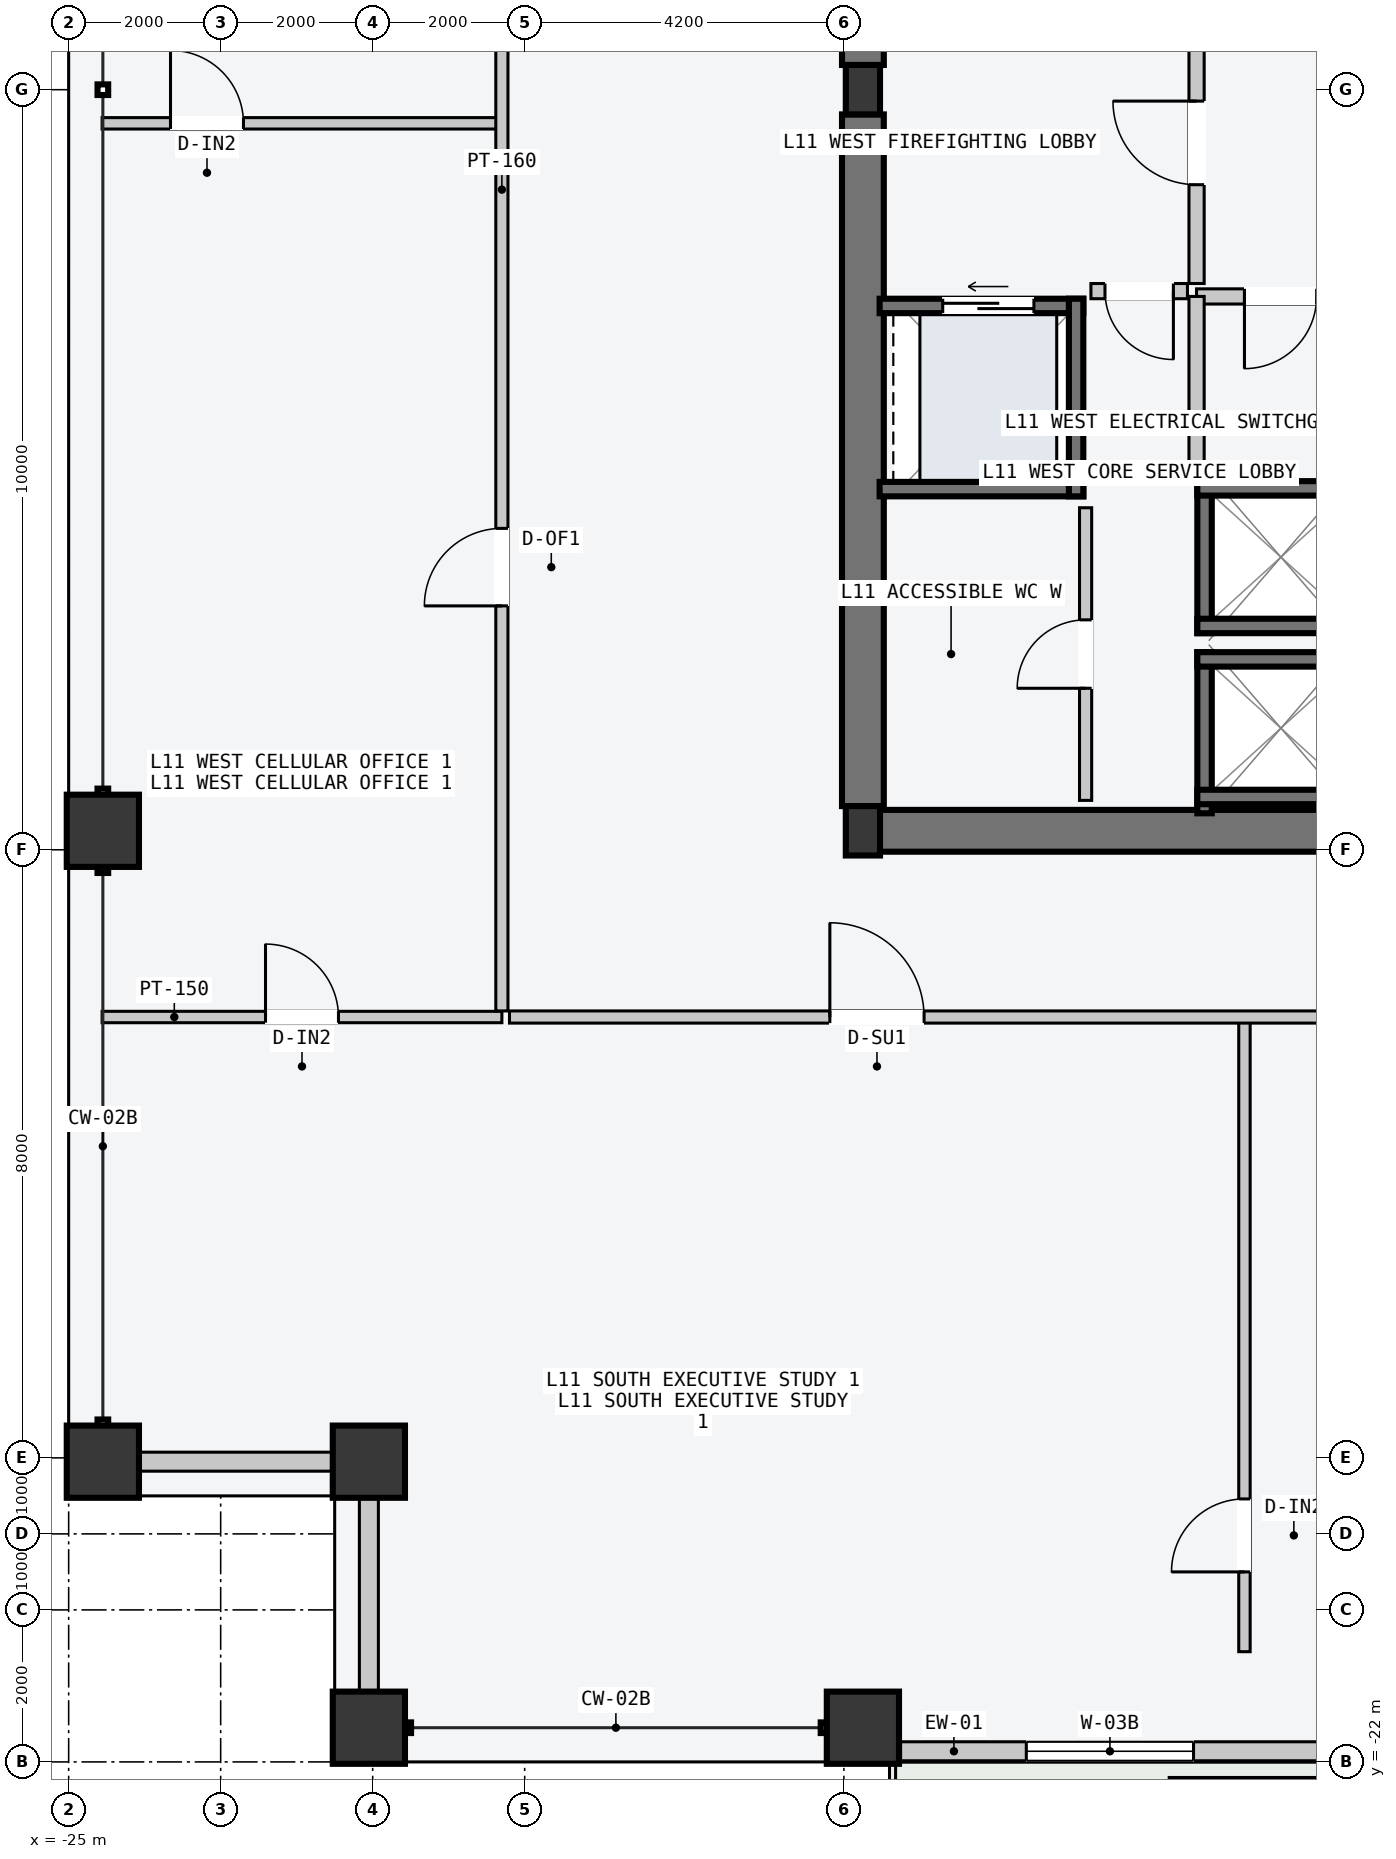
"""IFC4 building model, lengths in metres.
Left out: names, types, materials, properties, quantities, classifications, styles, units other than length and angle.
Written with IfcOpenShell. Run it as: python <this file> out.ifc"""

import sys

from ifc_helpers import new_model, si_unit, direction, frame, frame_2d, origin, origin_2d, place, context, subcontext, project, spatial, rectangle, hollow_rectangle, i_section, extrude, element, fill, save


model = new_model("IFC4")
c1 = context("Model", 3, precision=1e-05, world=origin(), true_north=direction((0.0, 1.0)))
c2 = subcontext(c1, "Body", "Model", "MODEL_VIEW")
j1 = project(units=[si_unit("LENGTHUNIT", "METRE"), si_unit("PLANEANGLEUNIT", "RADIAN")], contexts=[c1])
p1 = place(None, origin())
s1 = spatial("IfcSite", under=j1, at=p1, CompositionType="ELEMENT")
p2 = place(p1, origin())
s2 = spatial("IfcBuilding", under=s1, at=p2, CompositionType="ELEMENT")
p3 = place(p2, frame((0.0, 0.0, 45.6)))
s3 = spatial("IfcBuildingStorey", under=s2, at=p3, CompositionType="ELEMENT", Elevation=45.6)
p4 = place(p3, frame((-14.53, -9.75, -0.2), z_axis=(0.0, 0.0, 1.0), x_axis=(1.0, 0.0, 0.0)))
e1 = element("IfcWall", 1, at=p4, inside=s3, PredefinedType="SHEAR", context=c2, shape_type="SweptSolid", body=[
    extrude(rectangle(XDim=6.46, YDim=0.55, at=frame_2d((3.23, 0.0))), origin(), (0.0, 0.0, 1.0), 3.6),
])
for number, where, z_axis, x_axis in (
    (2, (-14.55, -9.425, -0.2), (0.0, 0.0, 1.0), (0.0, 1.0, 0.0)),
    (3, (-14.55, 0.325, -0.2), (0.0, 0.0, 1.0), (0.0, 1.0, 0.0)),
):
    element("IfcWall", number, at=place(p3, frame(where, z_axis=z_axis, x_axis=x_axis)), inside=s3, PredefinedType="SHEAR", context=c2, shape_type="SweptSolid", body=[
        extrude(rectangle(XDim=9.1, YDim=0.55, at=frame_2d((4.55, 0.0))), origin(), (0.0, 0.0, 1.0), 3.6),
    ])
for number, where, z_axis, x_axis in (
    (4, (-14.55, -9.75, 0.0), (0.0, 0.0, 1.0), (1.0, 0.0, 0.0)),
    (5, (-14.55, 0.0, 0.0), (0.0, 0.0, 1.0), (1.0, 0.0, 0.0)),
):
    element("IfcColumn", number, at=place(p3, frame(where, z_axis=z_axis, x_axis=x_axis)), inside=s3, PredefinedType="COLUMN", context=c2, shape_type="SweptSolid", body=[
        extrude(i_section(OverallWidth=0.45, OverallDepth=0.65, WebThickness=0.025, FlangeThickness=0.04, at=origin_2d()), origin(), (0.0, 0.0, 1.0), 3.6),
    ])
for number, where, z_axis, x_axis in (
    (6, (-21.05, -21.55, 0.0), (0.0, 0.0, 1.0), (1.0, 0.0, 0.0)),
    (7, (-14.55, -21.55, 0.0), (0.0, 0.0, 1.0), (1.0, 0.0, 0.0)),
    (8, (-24.55, -18.05, 0.0), (0.0, 0.0, 1.0), (0.0, 1.0, 0.0)),
    (9, (-24.55, -9.75, 0.0), (0.0, 0.0, 1.0), (0.0, 1.0, 0.0)),
    (10, (-21.05, -18.05, 0.0), (0.0, 0.0, 1.0), (1.0, 0.0, 0.0)),
):
    element("IfcColumn", number, at=place(p3, frame(where, z_axis=z_axis, x_axis=x_axis)), inside=s3, PredefinedType="COLUMN", context=c2, shape_type="SweptSolid", body=[
        extrude(hollow_rectangle(XDim=0.95, YDim=0.95, WallThickness=0.048, at=origin_2d()), origin(), (0.0, 0.0, 1.0), 3.6),
    ])
p5 = place(p3, frame((-14.055, -21.86, 0.0), z_axis=(0.0, 0.0, 1.0), x_axis=(1.0, 0.0, 0.0)))
e11 = element("IfcWall", 11, at=p5, inside=s3, PredefinedType="STANDARD", context=c2, shape_type="SweptSolid", body=[
    extrude(rectangle(XDim=5.51, YDim=0.25, at=frame_2d((2.755, 0.0))), origin(), (0.0, 0.0, 1.0), 3.4),
])
p6 = place(p5, frame((1.655, 0.0, 0.85)))
e12 = element("IfcOpeningElement", 12, at=p6, cuts=e11, PredefinedType="OPENING", context=c2, shape_type="SweptSolid", body=[
    extrude(rectangle(XDim=2.2, YDim=2.1, at=frame_2d((1.1, 1.05))), frame((0.0, 0.135, 0.0), z_axis=(0.0, -1.0, 0.0), x_axis=(1.0, 0.0, 0.0)), (0.0, 0.0, 1.0), 0.27),
])
for number, where, z_axis, x_axis in (
    (13, (-24.065, -18.05, 0.0), (0.0, 0.0, 1.0), (1.0, 0.0, 0.0)),
    (14, (-21.05, -21.065, 0.0), (0.0, 0.0, 1.0), (0.0, 1.0, 0.0)),
):
    element("IfcWall", number, at=place(p3, frame(where, z_axis=z_axis, x_axis=x_axis)), inside=s3, PredefinedType="STANDARD", context=c2, shape_type="SweptSolid", body=[
        extrude(rectangle(XDim=2.53, YDim=0.25, at=frame_2d((1.265, 0.0))), origin(), (0.0, 0.0, 1.0), 2.7),
    ])
p7 = place(p3, frame((-10.055, -9.52, -0.2), z_axis=(0.0, 0.0, 1.0), x_axis=(0.0, 1.0, 0.0)))
e15 = element("IfcWall", 15, at=p7, inside=s3, PredefinedType="SOLIDWALL", context=c2, shape_type="SweptSolid", body=[
    extrude(rectangle(XDim=2.12, YDim=0.19, at=frame_2d((1.06, 0.0))), origin(), (0.0, 0.0, 1.0), 3.6),
])
for number, where, z_axis, x_axis in (
    (16, (-10.15, -7.495, -0.2), (0.0, 0.0, 1.0), (1.0, 0.0, 0.0)),
    (17, (-10.15, -9.305, -0.2), (0.0, 0.0, 1.0), (1.0, 0.0, 0.0)),
):
    element("IfcWall", number, at=place(p3, frame(where, z_axis=z_axis, x_axis=x_axis)), inside=s3, PredefinedType="SOLIDWALL", context=c2, shape_type="SweptSolid", body=[
        extrude(rectangle(XDim=2.2, YDim=0.19, at=frame_2d((1.1, 0.0))), origin(), (0.0, 0.0, 1.0), 3.6),
    ])
p8 = place(p3, frame((-10.055, -7.15, -0.2), z_axis=(0.0, 0.0, 1.0), x_axis=(0.0, 1.0, 0.0)))
e18 = element("IfcWall", 18, at=p8, inside=s3, PredefinedType="SOLIDWALL", context=c2, shape_type="SweptSolid", body=[
    extrude(rectangle(XDim=2.0, YDim=0.19, at=frame_2d((1.0, 0.0))), origin(), (0.0, 0.0, 1.0), 3.6),
])
for number, where, z_axis, x_axis in (
    (19, (-10.15, -5.245, -0.2), (0.0, 0.0, 1.0), (1.0, 0.0, 0.0)),
    (20, (-10.15, -7.055, -0.2), (0.0, 0.0, 1.0), (1.0, 0.0, 0.0)),
):
    element("IfcWall", number, at=place(p3, frame(where, z_axis=z_axis, x_axis=x_axis)), inside=s3, PredefinedType="SOLIDWALL", context=c2, shape_type="SweptSolid", body=[
        extrude(rectangle(XDim=2.2, YDim=0.19, at=frame_2d((1.1, 0.0))), origin(), (0.0, 0.0, 1.0), 3.6),
    ])
p9 = place(p3, frame((-14.33, -2.845, -0.2), z_axis=(0.0, 0.0, 1.0), x_axis=(1.0, 0.0, 0.0)))
e21 = element("IfcWall", 21, at=p9, inside=s3, PredefinedType="SOLIDWALL", context=c2, shape_type="SweptSolid", body=[
    extrude(rectangle(XDim=2.68, YDim=0.19, at=frame_2d((1.34, 0.0))), origin(), (0.0, 0.0, 1.0), 3.6),
])
p10 = place(p9, frame((0.83, 0.0, 0.2)))
e22 = element("IfcOpeningElement", 22, at=p10, cuts=e21, PredefinedType="OPENING", context=c2, shape_type="SweptSolid", body=[
    extrude(rectangle(XDim=1.2, YDim=2.2, at=frame_2d((0.6, 1.1))), frame((0.0, 0.105, 0.0), z_axis=(0.0, -1.0, 0.0), x_axis=(1.0, 0.0, 0.0)), (0.0, 0.0, 1.0), 0.21),
])
p11 = place(p3, frame((-14.33, -5.255, -0.2), z_axis=(0.0, 0.0, 1.0), x_axis=(1.0, 0.0, 0.0)))
e23 = element("IfcWall", 23, at=p11, inside=s3, PredefinedType="SOLIDWALL", context=c2, shape_type="SweptSolid", body=[
    extrude(rectangle(XDim=2.68, YDim=0.19, at=frame_2d((1.34, 0.0))), origin(), (0.0, 0.0, 1.0), 3.6),
])
p12 = place(p3, frame((-11.745, -5.35, -0.2), z_axis=(0.0, 0.0, 1.0), x_axis=(0.0, 1.0, 0.0)))
e24 = element("IfcWall", 24, at=p12, inside=s3, PredefinedType="SOLIDWALL", context=c2, shape_type="SweptSolid", body=[
    extrude(rectangle(XDim=2.6, YDim=0.19, at=frame_2d((1.3, 0.0))), origin(), (0.0, 0.0, 1.0), 3.6),
])
p13 = place(p3, frame((-10.16, -2.55, 0.0), z_axis=(0.0, 0.0, 1.0), x_axis=(0.0, 1.0, 0.0)))
e25 = element("IfcWall", 25, at=p13, inside=s3, PredefinedType="PARTITIONING", context=c2, shape_type="SweptSolid", body=[
    extrude(rectangle(XDim=3.4, YDim=0.2, at=frame_2d((1.7, 0.0))), origin(), (0.0, 0.0, 1.0), 3.4),
])
p14 = place(p13, frame((1.3, 0.0, 0.0)))
e26 = element("IfcOpeningElement", 26, at=p14, cuts=e25, PredefinedType="OPENING", context=c2, shape_type="SweptSolid", body=[
    extrude(rectangle(XDim=1.1, YDim=2.15, at=frame_2d((0.55, 1.075))), frame((0.0, 0.11, 0.0), z_axis=(0.0, -1.0, 0.0), x_axis=(1.0, 0.0, 0.0)), (0.0, 0.0, 1.0), 0.22),
])
p15 = place(p3, frame((-10.28, -2.65, 0.0), z_axis=(0.0, 0.0, 1.0), x_axis=(-1.0, 0.0, 0.0)))
e27 = element("IfcWall", 27, at=p15, inside=s3, PredefinedType="PARTITIONING", context=c2, shape_type="SweptSolid", body=[
    extrude(rectangle(XDim=1.27, YDim=0.2, at=frame_2d((0.635, 0.0))), origin(), (0.0, 0.0, 1.0), 3.4),
])
p16 = place(p15, frame((0.185, 0.0, 0.0)))
e28 = element("IfcOpeningElement", 28, at=p16, cuts=e27, PredefinedType="OPENING", context=c2, shape_type="SweptSolid", body=[
    extrude(rectangle(XDim=0.9, YDim=2.15, at=frame_2d((0.45, 1.075))), frame((0.0, 0.11, 0.0), z_axis=(0.0, -1.0, 0.0), x_axis=(1.0, 0.0, 0.0)), (0.0, 0.0, 1.0), 0.22),
])
p17 = place(p3, frame((-7.96, -2.72, 0.0), z_axis=(0.0, 0.0, 1.0), x_axis=(-1.0, 0.0, 0.0)))
e29 = element("IfcWall", 29, at=p17, inside=s3, PredefinedType="PARTITIONING", context=c2, shape_type="SweptSolid", body=[
    extrude(rectangle(XDim=2.2, YDim=0.2, at=frame_2d((1.1, 0.0))), origin(), (0.0, 0.0, 1.0), 3.4),
])
p18 = place(p17, frame((0.62, 0.0, 0.0)))
e30 = element("IfcOpeningElement", 30, at=p18, cuts=e29, PredefinedType="OPENING", context=c2, shape_type="SweptSolid", body=[
    extrude(rectangle(XDim=0.95, YDim=2.1, at=frame_2d((0.475, 1.05))), frame((0.0, 0.11, 0.0), z_axis=(0.0, -1.0, 0.0), x_axis=(1.0, 0.0, 0.0)), (0.0, 0.0, 1.0), 0.22),
])
p19 = place(p3, frame((-10.16, -5.16, 0.0), z_axis=(0.0, 0.0, 1.0), x_axis=(0.0, 1.0, 0.0)))
e31 = element("IfcWall", 31, at=p19, inside=s3, PredefinedType="PARTITIONING", context=c2, shape_type="SweptSolid", body=[
    extrude(rectangle(XDim=2.44, YDim=0.2, at=frame_2d((1.22, 0.0))), origin(), (0.0, 0.0, 1.0), 3.4),
])
p20 = place(p3, frame((-11.62, -9.35, 0.0), z_axis=(0.0, 0.0, 1.0), x_axis=(0.0, 1.0, 0.0)))
e32 = element("IfcWall", 32, at=p20, inside=s3, PredefinedType="PARTITIONING", context=c2, shape_type="SweptSolid", body=[
    extrude(rectangle(XDim=3.85, YDim=0.16, at=frame_2d((1.925, 0.0))), origin(), (0.0, 0.0, 1.0), 3.4),
])
p21 = place(p20, frame((1.475, 0.0, 0.0)))
e33 = element("IfcOpeningElement", 33, at=p21, cuts=e32, PredefinedType="OPENING", context=c2, shape_type="SweptSolid", body=[
    extrude(rectangle(XDim=0.9, YDim=2.15, at=frame_2d((0.45, 1.075))), frame((0.0, 0.09, 0.0), z_axis=(0.0, -1.0, 0.0), x_axis=(1.0, 0.0, 0.0)), (0.0, 0.0, 1.0), 0.18),
])
p22 = place(p3, frame((-9.53, -20.55, 0.0), z_axis=(0.0, 0.0, 1.0), x_axis=(0.0, 1.0, 0.0)))
e34 = element("IfcWall", 34, at=p22, inside=s3, PredefinedType="PARTITIONING", context=c2, shape_type="SweptSolid", body=[
    extrude(rectangle(XDim=8.29, YDim=0.15, at=frame_2d((4.145, 0.0))), origin(), (0.0, 0.0, 1.0), 3.4),
])
p23 = place(p22, frame((1.05, 0.0, 0.0)))
e35 = element("IfcOpeningElement", 35, at=p23, cuts=e34, PredefinedType="OPENING", context=c2, shape_type="SweptSolid", body=[
    extrude(rectangle(XDim=0.96, YDim=2.18, at=frame_2d((0.48, 1.09))), frame((0.0, 0.085, 0.0), z_axis=(0.0, -1.0, 0.0), x_axis=(1.0, 0.0, 0.0)), (0.0, 0.0, 1.0), 0.17),
])
p24 = place(p3, frame((-19.2, -12.2, 0.0), z_axis=(0.0, 0.0, 1.0), x_axis=(1.0, 0.0, 0.0)))
e36 = element("IfcWall", 36, at=p24, inside=s3, PredefinedType="PARTITIONING", context=c2, shape_type="SweptSolid", body=[
    extrude(rectangle(XDim=38.4, YDim=0.16, at=frame_2d((19.2, 0.0))), origin(), (0.0, 0.0, 1.0), 3.4),
])
p25 = place(p24, frame((4.215, 0.0, 0.0)))
e37 = element("IfcOpeningElement", 37, at=p25, cuts=e36, PredefinedType="OPENING", context=c2, shape_type="SweptSolid", body=[
    extrude(rectangle(XDim=1.24, YDim=2.24, at=frame_2d((0.62, 1.12))), frame((0.0, 0.09, 0.0), z_axis=(0.0, -1.0, 0.0), x_axis=(1.0, 0.0, 0.0)), (0.0, 0.0, 1.0), 0.18),
])
p26 = place(p24, frame((15.129, 0.0, 0.0)))
e38 = element("IfcOpeningElement", 38, at=p26, cuts=e36, PredefinedType="OPENING", context=c2, shape_type="SweptSolid", body=[
    extrude(rectangle(XDim=1.4, YDim=2.2, at=frame_2d((0.7, 1.1))), frame((0.0, 0.09, 0.0), z_axis=(0.0, -1.0, 0.0), x_axis=(1.0, 0.0, 0.0)), (0.0, 0.0, 1.0), 0.18),
])
p27 = place(p24, frame((29.744, 0.0, 0.0)))
e39 = element("IfcOpeningElement", 39, at=p27, cuts=e36, PredefinedType="OPENING", context=c2, shape_type="SweptSolid", body=[
    extrude(rectangle(XDim=0.9, YDim=2.15, at=frame_2d((0.45, 1.075))), frame((0.0, 0.09, 0.0), z_axis=(0.0, -1.0, 0.0), x_axis=(1.0, 0.0, 0.0)), (0.0, 0.0, 1.0), 0.18),
])
p28 = place(p3, frame((-24.56, -12.2, 0.0), z_axis=(0.0, 0.0, 1.0), x_axis=(1.0, 0.0, 0.0)))
e40 = element("IfcWall", 40, at=p28, inside=s3, PredefinedType="PARTITIONING", context=c2, shape_type="SweptSolid", body=[
    extrude(rectangle(XDim=5.26, YDim=0.15, at=frame_2d((2.63, 0.0))), origin(), (0.0, 0.0, 1.0), 3.4),
])
p29 = place(p28, frame((2.15, 0.0, 0.0)))
e41 = element("IfcOpeningElement", 41, at=p29, cuts=e40, PredefinedType="OPENING", context=c2, shape_type="SweptSolid", body=[
    extrude(rectangle(XDim=0.96, YDim=2.18, at=frame_2d((0.48, 1.09))), frame((0.0, 0.085, 0.0), z_axis=(0.0, -1.0, 0.0), x_axis=(1.0, 0.0, 0.0)), (0.0, 0.0, 1.0), 0.17),
])
p30 = place(p3, frame((-24.56, -0.442, 0.0), z_axis=(0.0, 0.0, 1.0), x_axis=(1.0, 0.0, 0.0)))
e42 = element("IfcWall", 42, at=p30, inside=s3, PredefinedType="PARTITIONING", context=c2, shape_type="SweptSolid", body=[
    extrude(rectangle(XDim=5.2, YDim=0.15, at=frame_2d((2.6, 0.0))), origin(), (0.0, 0.0, 1.0), 3.4),
])
p31 = place(p30, frame((0.9, 0.0, 0.0)))
e43 = element("IfcOpeningElement", 43, at=p31, cuts=e42, PredefinedType="OPENING", context=c2, shape_type="SweptSolid", body=[
    extrude(rectangle(XDim=0.96, YDim=2.18, at=frame_2d((0.48, 1.09))), frame((0.0, 0.085, 0.0), z_axis=(0.0, -1.0, 0.0), x_axis=(1.0, 0.0, 0.0)), (0.0, 0.0, 1.0), 0.17),
])
p32 = place(p3, frame((-19.3, -12.12, 0.0), z_axis=(0.0, 0.0, 1.0), x_axis=(0.0, 1.0, 0.0)))
e44 = element("IfcWall", 44, at=p32, inside=s3, PredefinedType="PARTITIONING", context=c2, shape_type="SweptSolid", body=[
    extrude(rectangle(XDim=26.54, YDim=0.16, at=frame_2d((13.27, 0.0))), origin(), (0.0, 0.0, 1.0), 3.4),
])
p33 = place(p32, frame((5.329, 0.0, 0.0)))
e45 = element("IfcOpeningElement", 45, at=p33, cuts=e44, PredefinedType="OPENING", context=c2, shape_type="SweptSolid", body=[
    extrude(rectangle(XDim=1.02, YDim=2.2, at=frame_2d((0.51, 1.1))), frame((0.0, 0.09, 0.0), z_axis=(0.0, -1.0, 0.0), x_axis=(1.0, 0.0, 0.0)), (0.0, 0.0, 1.0), 0.18),
])
p34 = place(p32, frame((15.261, 0.0, 0.0)))
e46 = element("IfcOpeningElement", 46, at=p34, cuts=e44, PredefinedType="OPENING", context=c2, shape_type="SweptSolid", body=[
    extrude(rectangle(XDim=1.06, YDim=2.2, at=frame_2d((0.53, 1.1))), frame((0.0, 0.09, 0.0), z_axis=(0.0, -1.0, 0.0), x_axis=(1.0, 0.0, 0.0)), (0.0, 0.0, 1.0), 0.18),
])
p35 = place(p32, frame((22.603, 0.0, 0.0)))
e47 = element("IfcOpeningElement", 47, at=p35, cuts=e44, PredefinedType="OPENING", context=c2, shape_type="SweptSolid", body=[
    extrude(rectangle(XDim=1.24, YDim=2.24, at=frame_2d((0.62, 1.12))), frame((0.0, 0.09, 0.0), z_axis=(0.0, -1.0, 0.0), x_axis=(1.0, 0.0, 0.0)), (0.0, 0.0, 1.0), 0.18),
])
p36 = place(p6, origin())
e48 = element("IfcWindow", 48, at=p36, inside=s3, PartitioningType="SINGLE_PANEL", PredefinedType="WINDOW", context=c2, shape_type="SweptSolid", body=[
    extrude(rectangle(XDim=2.2, YDim=2.1, at=frame_2d((1.1, 1.05))), frame((0.0, 0.03, 0.0), z_axis=(0.0, -1.0, 0.0), x_axis=(1.0, 0.0, 0.0)), (0.0, 0.0, 1.0), 0.06),
])
fill(e12, e48)
p37 = place(p10, origin())
e49 = element("IfcDoor", 49, at=p37, inside=s3, OperationType="SLIDING_TO_LEFT", PredefinedType="DOOR", context=c2, shape_type="SweptSolid", body=[
    extrude(rectangle(XDim=1.2, YDim=2.2, at=frame_2d((0.6, 1.1))), frame((0.0, 0.025, 0.0), z_axis=(0.0, -1.0, 0.0), x_axis=(1.0, 0.0, 0.0)), (0.0, 0.0, 1.0), 0.05),
])
fill(e22, e49)
p38 = place(p14, origin())
e50 = element("IfcDoor", 50, at=p38, inside=s3, OperationType="SINGLE_SWING_RIGHT", PredefinedType="DOOR", context=c2, shape_type="SweptSolid", body=[
    extrude(rectangle(XDim=1.1, YDim=2.15, at=frame_2d((0.55, 1.075))), frame((0.0, 0.025, 0.0), z_axis=(0.0, -1.0, 0.0), x_axis=(1.0, 0.0, 0.0)), (0.0, 0.0, 1.0), 0.05),
])
fill(e26, e50)
p39 = place(p16, origin())
e51 = element("IfcDoor", 51, at=p39, inside=s3, OperationType="SINGLE_SWING_LEFT", PredefinedType="DOOR", context=c2, shape_type="SweptSolid", body=[
    extrude(rectangle(XDim=0.9, YDim=2.15, at=frame_2d((0.45, 1.075))), frame((0.0, 0.025, 0.0), z_axis=(0.0, -1.0, 0.0), x_axis=(1.0, 0.0, 0.0)), (0.0, 0.0, 1.0), 0.05),
])
fill(e28, e51)
p40 = place(p18, origin())
e52 = element("IfcDoor", 52, at=p40, inside=s3, OperationType="SINGLE_SWING_RIGHT", PredefinedType="DOOR", context=c2, shape_type="SweptSolid", body=[
    extrude(rectangle(XDim=0.95, YDim=2.1, at=frame_2d((0.475, 1.05))), frame((0.0, 0.025, 0.0), z_axis=(0.0, -1.0, 0.0), x_axis=(1.0, 0.0, 0.0)), (0.0, 0.0, 1.0), 0.05),
])
fill(e30, e52)
p41 = place(p21, origin())
e53 = element("IfcDoor", 53, at=p41, inside=s3, OperationType="SINGLE_SWING_LEFT", PredefinedType="DOOR", context=c2, shape_type="SweptSolid", body=[
    extrude(rectangle(XDim=0.9, YDim=2.15, at=frame_2d((0.45, 1.075))), frame((0.0, 0.025, 0.0), z_axis=(0.0, -1.0, 0.0), x_axis=(1.0, 0.0, 0.0)), (0.0, 0.0, 1.0), 0.05),
])
fill(e33, e53)
p42 = place(p23, origin())
e54 = element("IfcDoor", 54, at=p42, inside=s3, OperationType="SINGLE_SWING_LEFT", PredefinedType="DOOR", context=c2, shape_type="SweptSolid", body=[
    extrude(rectangle(XDim=0.96, YDim=2.18, at=frame_2d((0.48, 1.09))), frame((0.0, 0.025, 0.0), z_axis=(0.0, -1.0, 0.0), x_axis=(1.0, 0.0, 0.0)), (0.0, 0.0, 1.0), 0.05),
])
fill(e35, e54)
p43 = place(p25, origin())
e55 = element("IfcDoor", 55, at=p43, inside=s3, OperationType="SINGLE_SWING_LEFT", PredefinedType="DOOR", context=c2, shape_type="SweptSolid", body=[
    extrude(rectangle(XDim=1.24, YDim=2.24, at=frame_2d((0.62, 1.12))), frame((0.0, 0.025, 0.0), z_axis=(0.0, -1.0, 0.0), x_axis=(1.0, 0.0, 0.0)), (0.0, 0.0, 1.0), 0.05),
])
fill(e37, e55)
p44 = place(p29, origin())
e56 = element("IfcDoor", 56, at=p44, inside=s3, OperationType="SINGLE_SWING_LEFT", PredefinedType="DOOR", context=c2, shape_type="SweptSolid", body=[
    extrude(rectangle(XDim=0.96, YDim=2.18, at=frame_2d((0.48, 1.09))), frame((0.0, 0.025, 0.0), z_axis=(0.0, -1.0, 0.0), x_axis=(1.0, 0.0, 0.0)), (0.0, 0.0, 1.0), 0.05),
])
fill(e41, e56)
p45 = place(p31, origin())
e57 = element("IfcDoor", 57, at=p45, inside=s3, OperationType="SINGLE_SWING_LEFT", PredefinedType="DOOR", context=c2, shape_type="SweptSolid", body=[
    extrude(rectangle(XDim=0.96, YDim=2.18, at=frame_2d((0.48, 1.09))), frame((0.0, 0.025, 0.0), z_axis=(0.0, -1.0, 0.0), x_axis=(1.0, 0.0, 0.0)), (0.0, 0.0, 1.0), 0.05),
])
fill(e43, e57)
p46 = place(p33, origin())
e58 = element("IfcDoor", 58, at=p46, inside=s3, OperationType="SINGLE_SWING_LEFT", PredefinedType="DOOR", context=c2, shape_type="SweptSolid", body=[
    extrude(rectangle(XDim=1.02, YDim=2.2, at=frame_2d((0.51, 1.1))), frame((0.0, 0.025, 0.0), z_axis=(0.0, -1.0, 0.0), x_axis=(1.0, 0.0, 0.0)), (0.0, 0.0, 1.0), 0.05),
])
fill(e45, e58)
save(model, sys.argv[1])
